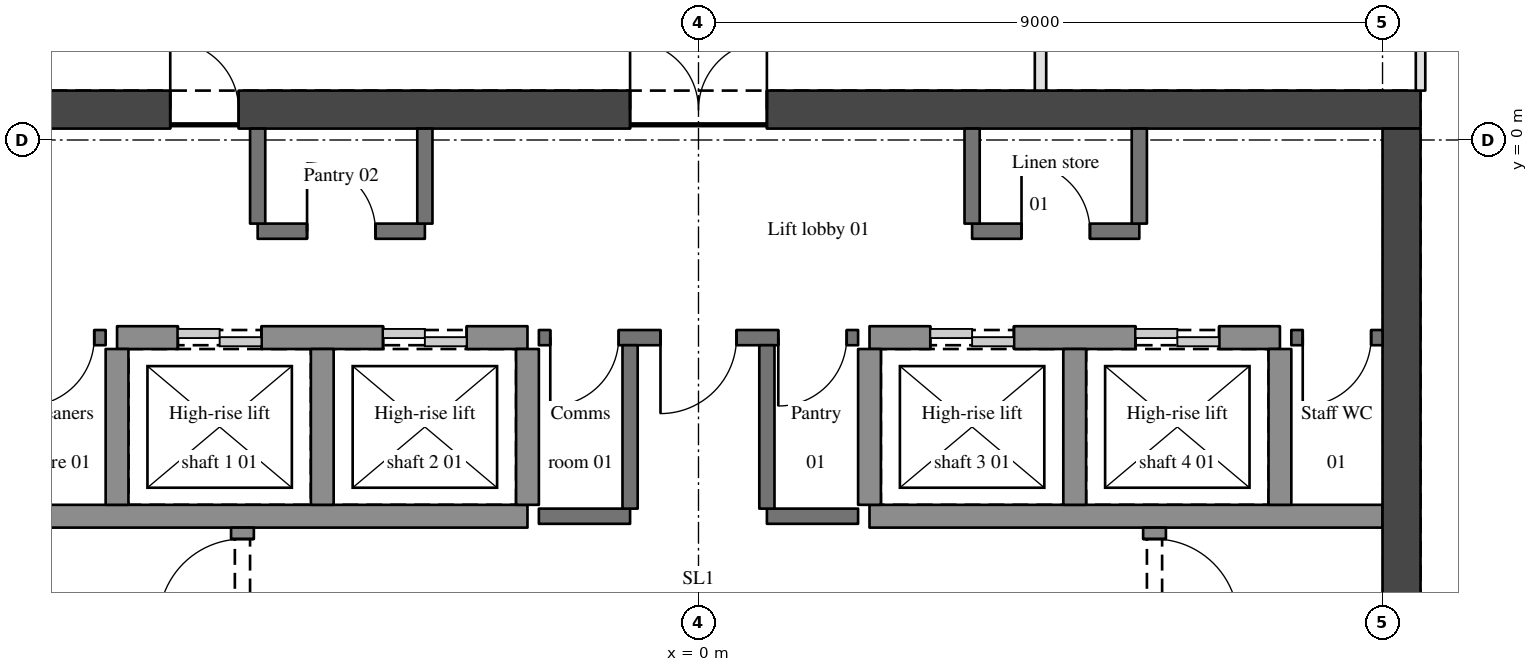
"""IFC4 building model, lengths in metres.
Left out: names, types, materials, properties, quantities, classifications, styles, units other than length and angle.
Written with IfcOpenShell. Run it as: python <this file> out.ifc"""

import sys

from ifc_helpers import new_model, si_unit, direction, frame, frame_2d, origin, place, context, subcontext, project, spatial, rectangle, extrude, element, fill, save


model = new_model("IFC4")
c1 = context("Model", 3, precision=1e-05, world=origin(), true_north=direction((0.0, 1.0)))
c2 = subcontext(c1, "Body", "Model", "MODEL_VIEW")
j1 = project(units=[si_unit("LENGTHUNIT", "METRE"), si_unit("PLANEANGLEUNIT", "RADIAN")], contexts=[c1])
p1 = place(None, origin())
s1 = spatial("IfcSite", under=j1, at=p1, CompositionType="ELEMENT")
p2 = place(p1, origin())
s2 = spatial("IfcBuilding", under=s1, at=p2, CompositionType="ELEMENT")
p3 = place(p2, frame((0.0, 0.0, 217.2)))
s3 = spatial("IfcBuildingStorey", under=s2, at=p3, CompositionType="ELEMENT", Elevation=217.2)
p4 = place(p3, frame((-9.5, 0.4, 0.0), z_axis=(0.0, 0.0, 1.0), x_axis=(1.0, 0.0, 0.0)))
e1 = element("IfcWall", 1, at=p4, inside=s3, PredefinedType="SHEAR", context=c2, shape_type="SweptSolid", body=[
    extrude(rectangle(XDim=19.0, YDim=0.5, at=frame_2d((9.5, 0.0))), origin(), (0.0, 0.0, 1.0), 3.15),
])
p5 = place(p4, frame((8.6, 0.0, 0.0)))
e2 = element("IfcOpeningElement", 2, at=p5, cuts=e1, PredefinedType="OPENING", context=c2, shape_type="SweptSolid", body=[
    extrude(rectangle(XDim=1.8, YDim=2.1, at=frame_2d((0.9, 1.05))), frame((0.0, 0.26, 0.0), z_axis=(0.0, -1.0, 0.0), x_axis=(1.0, 0.0, 0.0)), (0.0, 0.0, 1.0), 0.52),
])
p6 = place(p4, frame((2.55, 0.0, 0.0)))
e3 = element("IfcOpeningElement", 3, at=p6, cuts=e1, PredefinedType="OPENING", context=c2, shape_type="SweptSolid", body=[
    extrude(rectangle(XDim=0.9, YDim=2.1, at=frame_2d((0.45, 1.05))), frame((0.0, 0.26, 0.0), z_axis=(0.0, -1.0, 0.0), x_axis=(1.0, 0.0, 0.0)), (0.0, 0.0, 1.0), 0.52),
])
p7 = place(p3, frame((9.25, -11.5, 0.0), z_axis=(0.0, 0.0, 1.0), x_axis=(0.0, 1.0, 0.0)))
e4 = element("IfcWall", 4, at=p7, inside=s3, PredefinedType="SHEAR", context=c2, shape_type="SweptSolid", body=[
    extrude(rectangle(XDim=11.65, YDim=0.5, at=frame_2d((5.825, 0.0))), origin(), (0.0, 0.0, 1.0), 3.15),
])
p8 = place(p3, frame((-9.0, -4.95, 0.0), z_axis=(0.0, 0.0, 1.0), x_axis=(1.0, 0.0, 0.0)))
e5 = element("IfcWall", 5, at=p8, inside=s3, PredefinedType="SHEAR", context=c2, shape_type="SweptSolid", body=[
    extrude(rectangle(XDim=6.75, YDim=0.3, at=frame_2d((3.375, 0.0))), origin(), (0.0, 0.0, 1.0), 3.15),
])
for number, where, z_axis, x_axis in (
    (6, (-2.1, -4.95, 0.0), (0.0, 0.0, 1.0), (1.0, 0.0, 0.0)),
    (7, (0.9, -4.95, 0.0), (0.0, 0.0, 1.0), (1.0, 0.0, 0.0)),
):
    element("IfcWall", number, at=place(p3, frame(where, z_axis=z_axis, x_axis=x_axis)), inside=s3, PredefinedType="SOLIDWALL", context=c2, shape_type="SweptSolid", body=[
        extrude(rectangle(XDim=1.2, YDim=0.2, at=frame_2d((0.6, 0.0))), origin(), (0.0, 0.0, 1.0), 2.85),
    ])
p9 = place(p3, frame((2.25, -4.95, 0.0), z_axis=(0.0, 0.0, 1.0), x_axis=(1.0, 0.0, 0.0)))
e8 = element("IfcWall", 8, at=p9, inside=s3, PredefinedType="SHEAR", context=c2, shape_type="SweptSolid", body=[
    extrude(rectangle(XDim=6.75, YDim=0.3, at=frame_2d((3.375, 0.0))), origin(), (0.0, 0.0, 1.0), 3.15),
])
p10 = place(p3, frame((-7.8, -2.6, 0.0), z_axis=(0.0, 0.0, 1.0), x_axis=(-1.0, 0.0, 0.0)))
e9 = element("IfcWall", 9, at=p10, inside=s3, PredefinedType="SOLIDWALL", context=c2, shape_type="SweptSolid", body=[
    extrude(rectangle(XDim=1.2, YDim=0.2, at=frame_2d((0.6, 0.0))), origin(), (0.0, 0.0, 1.0), 2.85),
])
p11 = place(p10, frame((0.15, 0.0, 0.0)))
e10 = element("IfcOpeningElement", 10, at=p11, cuts=e9, PredefinedType="OPENING", context=c2, shape_type="SweptSolid", body=[
    extrude(rectangle(XDim=0.9, YDim=2.1, at=frame_2d((0.45, 1.05))), frame((0.0, 0.11, 0.0), z_axis=(0.0, -1.0, 0.0), x_axis=(1.0, 0.0, 0.0)), (0.0, 0.0, 1.0), 0.22),
])
p12 = place(p3, frame((-7.65, -2.6, 0.0), z_axis=(0.0, 0.0, 1.0), x_axis=(1.0, 0.0, 0.0)))
e11 = element("IfcWall", 11, at=p12, inside=s3, PredefinedType="SHEAR", context=c2, shape_type="SweptSolid", body=[
    extrude(rectangle(XDim=5.4, YDim=0.3, at=frame_2d((2.7, 0.0))), origin(), (0.0, 0.0, 1.0), 3.15),
])
p13 = place(p12, frame((0.8, 0.0, 0.0)))
e12 = element("IfcOpeningElement", 12, at=p13, cuts=e11, PredefinedType="OPENING", context=c2, shape_type="SweptSolid", body=[
    extrude(rectangle(XDim=1.1, YDim=2.1, at=frame_2d((0.55, 1.05))), frame((0.0, 0.16, 0.0), z_axis=(0.0, -1.0, 0.0), x_axis=(1.0, 0.0, 0.0)), (0.0, 0.0, 1.0), 0.32),
])
p14 = place(p12, frame((3.5, 0.0, 0.0)))
e13 = element("IfcOpeningElement", 13, at=p14, cuts=e11, PredefinedType="OPENING", context=c2, shape_type="SweptSolid", body=[
    extrude(rectangle(XDim=1.1, YDim=2.1, at=frame_2d((0.55, 1.05))), frame((0.0, 0.16, 0.0), z_axis=(0.0, -1.0, 0.0), x_axis=(1.0, 0.0, 0.0)), (0.0, 0.0, 1.0), 0.32),
])
p15 = place(p3, frame((2.1, -2.6, 0.0), z_axis=(0.0, 0.0, 1.0), x_axis=(-1.0, 0.0, 0.0)))
e14 = element("IfcWall", 14, at=p15, inside=s3, PredefinedType="SOLIDWALL", context=c2, shape_type="SweptSolid", body=[
    extrude(rectangle(XDim=4.2, YDim=0.2, at=frame_2d((2.1, 0.0))), origin(), (0.0, 0.0, 1.0), 2.85),
])
p16 = place(p15, frame((1.6, 0.0, 0.0)))
e15 = element("IfcOpeningElement", 15, at=p16, cuts=e14, PredefinedType="OPENING", context=c2, shape_type="SweptSolid", body=[
    extrude(rectangle(XDim=1.0, YDim=2.1, at=frame_2d((0.5, 1.05))), frame((0.0, 0.11, 0.0), z_axis=(0.0, -1.0, 0.0), x_axis=(1.0, 0.0, 0.0)), (0.0, 0.0, 1.0), 0.22),
])
p17 = place(p15, frame((3.15, 0.0, 0.0)))
e16 = element("IfcOpeningElement", 16, at=p17, cuts=e14, PredefinedType="OPENING", context=c2, shape_type="SweptSolid", body=[
    extrude(rectangle(XDim=0.9, YDim=2.1, at=frame_2d((0.45, 1.05))), frame((0.0, 0.11, 0.0), z_axis=(0.0, -1.0, 0.0), x_axis=(1.0, 0.0, 0.0)), (0.0, 0.0, 1.0), 0.22),
])
p18 = place(p15, frame((0.15, 0.0, 0.0)))
e17 = element("IfcOpeningElement", 17, at=p18, cuts=e14, PredefinedType="OPENING", context=c2, shape_type="SweptSolid", body=[
    extrude(rectangle(XDim=0.9, YDim=2.1, at=frame_2d((0.45, 1.05))), frame((0.0, 0.11, 0.0), z_axis=(0.0, -1.0, 0.0), x_axis=(1.0, 0.0, 0.0)), (0.0, 0.0, 1.0), 0.22),
])
p19 = place(p3, frame((2.25, -2.6, 0.0), z_axis=(0.0, 0.0, 1.0), x_axis=(1.0, 0.0, 0.0)))
e18 = element("IfcWall", 18, at=p19, inside=s3, PredefinedType="SHEAR", context=c2, shape_type="SweptSolid", body=[
    extrude(rectangle(XDim=5.4, YDim=0.3, at=frame_2d((2.7, 0.0))), origin(), (0.0, 0.0, 1.0), 3.15),
])
p20 = place(p19, frame((0.8, 0.0, 0.0)))
e19 = element("IfcOpeningElement", 19, at=p20, cuts=e18, PredefinedType="OPENING", context=c2, shape_type="SweptSolid", body=[
    extrude(rectangle(XDim=1.1, YDim=2.1, at=frame_2d((0.55, 1.05))), frame((0.0, 0.16, 0.0), z_axis=(0.0, -1.0, 0.0), x_axis=(1.0, 0.0, 0.0)), (0.0, 0.0, 1.0), 0.32),
])
p21 = place(p19, frame((3.5, 0.0, 0.0)))
e20 = element("IfcOpeningElement", 20, at=p21, cuts=e18, PredefinedType="OPENING", context=c2, shape_type="SweptSolid", body=[
    extrude(rectangle(XDim=1.1, YDim=2.1, at=frame_2d((0.55, 1.05))), frame((0.0, 0.16, 0.0), z_axis=(0.0, -1.0, 0.0), x_axis=(1.0, 0.0, 0.0)), (0.0, 0.0, 1.0), 0.32),
])
p22 = place(p3, frame((9.0, -2.6, 0.0), z_axis=(0.0, 0.0, 1.0), x_axis=(-1.0, 0.0, 0.0)))
e21 = element("IfcWall", 21, at=p22, inside=s3, PredefinedType="SOLIDWALL", context=c2, shape_type="SweptSolid", body=[
    extrude(rectangle(XDim=1.2, YDim=0.2, at=frame_2d((0.6, 0.0))), origin(), (0.0, 0.0, 1.0), 2.85),
])
p23 = place(p22, frame((0.15, 0.0, 0.0)))
e22 = element("IfcOpeningElement", 22, at=p23, cuts=e21, PredefinedType="OPENING", context=c2, shape_type="SweptSolid", body=[
    extrude(rectangle(XDim=0.9, YDim=2.1, at=frame_2d((0.45, 1.05))), frame((0.0, 0.11, 0.0), z_axis=(0.0, -1.0, 0.0), x_axis=(1.0, 0.0, 0.0)), (0.0, 0.0, 1.0), 0.22),
])
p24 = place(p3, frame((-5.8, -1.2, 0.0), z_axis=(0.0, 0.0, 1.0), x_axis=(1.0, 0.0, 0.0)))
e23 = element("IfcWall", 23, at=p24, inside=s3, PredefinedType="SOLIDWALL", context=c2, shape_type="SweptSolid", body=[
    extrude(rectangle(XDim=2.2, YDim=0.2, at=frame_2d((1.1, 0.0))), origin(), (0.0, 0.0, 1.0), 2.85),
])
p25 = place(p24, frame((0.65, 0.0, 0.0)))
e24 = element("IfcOpeningElement", 24, at=p25, cuts=e23, PredefinedType="OPENING", context=c2, shape_type="SweptSolid", body=[
    extrude(rectangle(XDim=0.9, YDim=2.1, at=frame_2d((0.45, 1.05))), frame((0.0, 0.11, 0.0), z_axis=(0.0, -1.0, 0.0), x_axis=(1.0, 0.0, 0.0)), (0.0, 0.0, 1.0), 0.22),
])
p26 = place(p3, frame((3.6, -1.2, 0.0), z_axis=(0.0, 0.0, 1.0), x_axis=(1.0, 0.0, 0.0)))
e25 = element("IfcWall", 25, at=p26, inside=s3, PredefinedType="SOLIDWALL", context=c2, shape_type="SweptSolid", body=[
    extrude(rectangle(XDim=2.2, YDim=0.2, at=frame_2d((1.1, 0.0))), origin(), (0.0, 0.0, 1.0), 2.85),
])
p27 = place(p26, frame((0.65, 0.0, 0.0)))
e26 = element("IfcOpeningElement", 26, at=p27, cuts=e25, PredefinedType="OPENING", context=c2, shape_type="SweptSolid", body=[
    extrude(rectangle(XDim=0.9, YDim=2.1, at=frame_2d((0.45, 1.05))), frame((0.0, 0.11, 0.0), z_axis=(0.0, -1.0, 0.0), x_axis=(1.0, 0.0, 0.0)), (0.0, 0.0, 1.0), 0.22),
])
p28 = place(p3, frame((-7.65, -4.8, 0.0), z_axis=(0.0, 0.0, 1.0), x_axis=(0.0, 1.0, 0.0)))
e27 = element("IfcWall", 27, at=p28, inside=s3, PredefinedType="SHEAR", context=c2, shape_type="SweptSolid", body=[
    extrude(rectangle(XDim=2.05, YDim=0.3, at=frame_2d((1.025, 0.0))), origin(), (0.0, 0.0, 1.0), 3.15),
])
p29 = place(p3, frame((-6.0, -11.5, 0.0), z_axis=(0.0, 0.0, 1.0), x_axis=(0.0, 1.0, 0.0)))
e28 = element("IfcWall", 28, at=p29, inside=s3, PredefinedType="SHEAR", context=c2, shape_type="SweptSolid", body=[
    extrude(rectangle(XDim=6.4, YDim=0.3, at=frame_2d((3.2, 0.0))), origin(), (0.0, 0.0, 1.0), 3.15),
])
p30 = place(p29, frame((5.15, 0.0, 0.0)))
e29 = element("IfcOpeningElement", 29, at=p30, cuts=e28, PredefinedType="OPENING", context=c2, shape_type="SweptSolid", body=[
    extrude(rectangle(XDim=1.1, YDim=2.1, at=frame_2d((0.55, 1.05))), frame((0.0, 0.16, 0.0), z_axis=(0.0, -1.0, 0.0), x_axis=(1.0, 0.0, 0.0)), (0.0, 0.0, 1.0), 0.32),
])
p31 = place(p3, frame((-5.8, -1.1, 0.0), z_axis=(0.0, 0.0, 1.0), x_axis=(0.0, 1.0, 0.0)))
e30 = element("IfcWall", 30, at=p31, inside=s3, PredefinedType="SOLIDWALL", context=c2, shape_type="SweptSolid", body=[
    extrude(rectangle(XDim=1.25, YDim=0.2, at=frame_2d((0.625, 0.0))), origin(), (0.0, 0.0, 1.0), 2.85),
])
p32 = place(p3, frame((-4.95, -4.8, 0.0), z_axis=(0.0, 0.0, 1.0), x_axis=(0.0, 1.0, 0.0)))
e31 = element("IfcWall", 31, at=p32, inside=s3, PredefinedType="SHEAR", context=c2, shape_type="SweptSolid", body=[
    extrude(rectangle(XDim=2.05, YDim=0.3, at=frame_2d((1.025, 0.0))), origin(), (0.0, 0.0, 1.0), 3.15),
])
p33 = place(p3, frame((-3.6, -1.1, 0.0), z_axis=(0.0, 0.0, 1.0), x_axis=(0.0, 1.0, 0.0)))
e32 = element("IfcWall", 32, at=p33, inside=s3, PredefinedType="SOLIDWALL", context=c2, shape_type="SweptSolid", body=[
    extrude(rectangle(XDim=1.25, YDim=0.2, at=frame_2d((0.625, 0.0))), origin(), (0.0, 0.0, 1.0), 2.85),
])
p34 = place(p3, frame((-2.25, -4.8, 0.0), z_axis=(0.0, 0.0, 1.0), x_axis=(0.0, 1.0, 0.0)))
e33 = element("IfcWall", 33, at=p34, inside=s3, PredefinedType="SHEAR", context=c2, shape_type="SweptSolid", body=[
    extrude(rectangle(XDim=2.05, YDim=0.3, at=frame_2d((1.025, 0.0))), origin(), (0.0, 0.0, 1.0), 3.15),
])
for number, where, z_axis, x_axis in (
    (34, (-0.9, -4.85, 0.0), (0.0, 0.0, 1.0), (0.0, 1.0, 0.0)),
    (35, (0.9, -4.85, 0.0), (0.0, 0.0, 1.0), (0.0, 1.0, 0.0)),
):
    element("IfcWall", number, at=place(p3, frame(where, z_axis=z_axis, x_axis=x_axis)), inside=s3, PredefinedType="SOLIDWALL", context=c2, shape_type="SweptSolid", body=[
        extrude(rectangle(XDim=2.15, YDim=0.2, at=frame_2d((1.075, 0.0))), origin(), (0.0, 0.0, 1.0), 2.85),
    ])
p35 = place(p3, frame((2.25, -4.8, 0.0), z_axis=(0.0, 0.0, 1.0), x_axis=(0.0, 1.0, 0.0)))
e36 = element("IfcWall", 36, at=p35, inside=s3, PredefinedType="SHEAR", context=c2, shape_type="SweptSolid", body=[
    extrude(rectangle(XDim=2.05, YDim=0.3, at=frame_2d((1.025, 0.0))), origin(), (0.0, 0.0, 1.0), 3.15),
])
p36 = place(p3, frame((3.6, -1.1, 0.0), z_axis=(0.0, 0.0, 1.0), x_axis=(0.0, 1.0, 0.0)))
e37 = element("IfcWall", 37, at=p36, inside=s3, PredefinedType="SOLIDWALL", context=c2, shape_type="SweptSolid", body=[
    extrude(rectangle(XDim=1.25, YDim=0.2, at=frame_2d((0.625, 0.0))), origin(), (0.0, 0.0, 1.0), 2.85),
])
p37 = place(p3, frame((4.5, 5.325, 0.0), z_axis=(0.0, 0.0, 1.0), x_axis=(0.0, -1.0, 0.0)))
e38 = element("IfcWall", 38, at=p37, inside=s3, PredefinedType="PARTITIONING", context=c2, shape_type="SweptSolid", body=[
    extrude(rectangle(XDim=4.675, YDim=0.15, at=frame_2d((2.337, 0.0))), origin(), (0.0, 0.0, 1.0), 2.21),
])
p38 = place(p37, frame((1.85, 0.0, 0.0)))
e39 = element("IfcOpeningElement", 39, at=p38, cuts=e38, PredefinedType="OPENING", context=c2, shape_type="SweptSolid", body=[
    extrude(rectangle(XDim=0.9, YDim=2.1, at=frame_2d((0.45, 1.05))), frame((0.0, 0.085, 0.0), z_axis=(0.0, -1.0, 0.0), x_axis=(1.0, 0.0, 0.0)), (0.0, 0.0, 1.0), 0.17),
])
p39 = place(p3, frame((4.95, -4.8, 0.0), z_axis=(0.0, 0.0, 1.0), x_axis=(0.0, 1.0, 0.0)))
e40 = element("IfcWall", 40, at=p39, inside=s3, PredefinedType="SHEAR", context=c2, shape_type="SweptSolid", body=[
    extrude(rectangle(XDim=2.05, YDim=0.3, at=frame_2d((1.025, 0.0))), origin(), (0.0, 0.0, 1.0), 3.15),
])
p40 = place(p3, frame((5.8, -1.1, 0.0), z_axis=(0.0, 0.0, 1.0), x_axis=(0.0, 1.0, 0.0)))
e41 = element("IfcWall", 41, at=p40, inside=s3, PredefinedType="SOLIDWALL", context=c2, shape_type="SweptSolid", body=[
    extrude(rectangle(XDim=1.25, YDim=0.2, at=frame_2d((0.625, 0.0))), origin(), (0.0, 0.0, 1.0), 2.85),
])
p41 = place(p3, frame((6.0, -5.1, 0.0), z_axis=(0.0, 0.0, 1.0), x_axis=(0.0, -1.0, 0.0)))
e42 = element("IfcWall", 42, at=p41, inside=s3, PredefinedType="SHEAR", context=c2, shape_type="SweptSolid", body=[
    extrude(rectangle(XDim=6.4, YDim=0.3, at=frame_2d((3.2, 0.0))), origin(), (0.0, 0.0, 1.0), 3.15),
])
p42 = place(p41, frame((0.15, 0.0, 0.0)))
e43 = element("IfcOpeningElement", 43, at=p42, cuts=e42, PredefinedType="OPENING", context=c2, shape_type="SweptSolid", body=[
    extrude(rectangle(XDim=1.1, YDim=2.1, at=frame_2d((0.55, 1.05))), frame((0.0, 0.16, 0.0), z_axis=(0.0, -1.0, 0.0), x_axis=(1.0, 0.0, 0.0)), (0.0, 0.0, 1.0), 0.32),
])
p43 = place(p3, frame((7.65, -4.8, 0.0), z_axis=(0.0, 0.0, 1.0), x_axis=(0.0, 1.0, 0.0)))
e44 = element("IfcWall", 44, at=p43, inside=s3, PredefinedType="SHEAR", context=c2, shape_type="SweptSolid", body=[
    extrude(rectangle(XDim=2.05, YDim=0.3, at=frame_2d((1.025, 0.0))), origin(), (0.0, 0.0, 1.0), 3.15),
])
p44 = place(p3, frame((9.5, 0.65, 0.0), z_axis=(0.0, 0.0, 1.0), x_axis=(0.0, 1.0, 0.0)))
e45 = element("IfcWall", 45, at=p44, inside=s3, PredefinedType="PARTITIONING", context=c2, shape_type="SweptSolid", body=[
    extrude(rectangle(XDim=8.85, YDim=0.125, at=frame_2d((4.425, 0.0))), origin(), (0.0, 0.0, 1.0), 2.21),
])
p45 = place(p5, origin())
e46 = element("IfcDoor", 46, at=p45, inside=s3, OperationType="DOUBLE_DOOR_SINGLE_SWING", PredefinedType="DOOR", context=c2, shape_type="SweptSolid", body=[
    extrude(rectangle(XDim=1.8, YDim=2.1, at=frame_2d((0.9, 1.05))), frame((0.0, 0.025, 0.0), z_axis=(0.0, -1.0, 0.0), x_axis=(1.0, 0.0, 0.0)), (0.0, 0.0, 1.0), 0.05),
])
fill(e2, e46)
p46 = place(p16, origin())
e47 = element("IfcDoor", 47, at=p46, inside=s3, OperationType="SINGLE_SWING_RIGHT", PredefinedType="DOOR", context=c2, shape_type="SweptSolid", body=[
    extrude(rectangle(XDim=1.0, YDim=2.1, at=frame_2d((0.5, 1.05))), frame((0.0, 0.025, 0.0), z_axis=(0.0, -1.0, 0.0), x_axis=(1.0, 0.0, 0.0)), (0.0, 0.0, 1.0), 0.05),
])
fill(e15, e47)
p47 = place(p30, origin())
e48 = element("IfcDoor", 48, at=p47, inside=s3, OperationType="SINGLE_SWING_LEFT", PredefinedType="DOOR", context=c2, shape_type="SweptSolid", body=[
    extrude(rectangle(XDim=1.1, YDim=2.1, at=frame_2d((0.55, 1.05))), frame((0.0, 0.025, 0.0), z_axis=(0.0, -1.0, 0.0), x_axis=(1.0, 0.0, 0.0)), (0.0, 0.0, 1.0), 0.05),
])
fill(e29, e48)
p48 = place(p42, origin())
e49 = element("IfcDoor", 49, at=p48, inside=s3, OperationType="SINGLE_SWING_RIGHT", PredefinedType="DOOR", context=c2, shape_type="SweptSolid", body=[
    extrude(rectangle(XDim=1.1, YDim=2.1, at=frame_2d((0.55, 1.05))), frame((0.0, 0.025, 0.0), z_axis=(0.0, -1.0, 0.0), x_axis=(1.0, 0.0, 0.0)), (0.0, 0.0, 1.0), 0.05),
])
fill(e43, e49)
p49 = place(p17, origin())
e50 = element("IfcDoor", 50, at=p49, inside=s3, OperationType="SINGLE_SWING_RIGHT", PredefinedType="DOOR", context=c2, shape_type="SweptSolid", body=[
    extrude(rectangle(XDim=0.9, YDim=2.1, at=frame_2d((0.45, 1.05))), frame((0.0, 0.025, 0.0), z_axis=(0.0, -1.0, 0.0), x_axis=(1.0, 0.0, 0.0)), (0.0, 0.0, 1.0), 0.05),
])
fill(e16, e50)
p50 = place(p18, origin())
e51 = element("IfcDoor", 51, at=p50, inside=s3, OperationType="SINGLE_SWING_RIGHT", PredefinedType="DOOR", context=c2, shape_type="SweptSolid", body=[
    extrude(rectangle(XDim=0.9, YDim=2.1, at=frame_2d((0.45, 1.05))), frame((0.0, 0.025, 0.0), z_axis=(0.0, -1.0, 0.0), x_axis=(1.0, 0.0, 0.0)), (0.0, 0.0, 1.0), 0.05),
])
fill(e17, e51)
p51 = place(p23, origin())
e52 = element("IfcDoor", 52, at=p51, inside=s3, OperationType="SINGLE_SWING_RIGHT", PredefinedType="DOOR", context=c2, shape_type="SweptSolid", body=[
    extrude(rectangle(XDim=0.9, YDim=2.1, at=frame_2d((0.45, 1.05))), frame((0.0, 0.025, 0.0), z_axis=(0.0, -1.0, 0.0), x_axis=(1.0, 0.0, 0.0)), (0.0, 0.0, 1.0), 0.05),
])
fill(e22, e52)
p52 = place(p11, origin())
e53 = element("IfcDoor", 53, at=p52, inside=s3, OperationType="SINGLE_SWING_RIGHT", PredefinedType="DOOR", context=c2, shape_type="SweptSolid", body=[
    extrude(rectangle(XDim=0.9, YDim=2.1, at=frame_2d((0.45, 1.05))), frame((0.0, 0.025, 0.0), z_axis=(0.0, -1.0, 0.0), x_axis=(1.0, 0.0, 0.0)), (0.0, 0.0, 1.0), 0.05),
])
fill(e10, e53)
p53 = place(p6, origin())
e54 = element("IfcDoor", 54, at=p53, inside=s3, OperationType="SINGLE_SWING_LEFT", PredefinedType="DOOR", context=c2, shape_type="SweptSolid", body=[
    extrude(rectangle(XDim=0.9, YDim=2.1, at=frame_2d((0.45, 1.05))), frame((0.0, 0.025, 0.0), z_axis=(0.0, -1.0, 0.0), x_axis=(1.0, 0.0, 0.0)), (0.0, 0.0, 1.0), 0.05),
])
fill(e3, e54)
p54 = place(p25, origin())
e55 = element("IfcDoor", 55, at=p54, inside=s3, OperationType="SINGLE_SWING_LEFT", PredefinedType="DOOR", context=c2, shape_type="SweptSolid", body=[
    extrude(rectangle(XDim=0.9, YDim=2.1, at=frame_2d((0.45, 1.05))), frame((0.0, 0.025, 0.0), z_axis=(0.0, -1.0, 0.0), x_axis=(1.0, 0.0, 0.0)), (0.0, 0.0, 1.0), 0.05),
])
fill(e24, e55)
p55 = place(p27, origin())
e56 = element("IfcDoor", 56, at=p55, inside=s3, OperationType="SINGLE_SWING_LEFT", PredefinedType="DOOR", context=c2, shape_type="SweptSolid", body=[
    extrude(rectangle(XDim=0.9, YDim=2.1, at=frame_2d((0.45, 1.05))), frame((0.0, 0.025, 0.0), z_axis=(0.0, -1.0, 0.0), x_axis=(1.0, 0.0, 0.0)), (0.0, 0.0, 1.0), 0.05),
])
fill(e26, e56)
p56 = place(p13, origin())
e57 = element("IfcDoor", 57, at=p56, inside=s3, OperationType="DOUBLE_DOOR_SLIDING", PredefinedType="DOOR", context=c2, shape_type="SweptSolid", body=[
    extrude(rectangle(XDim=1.1, YDim=2.1, at=frame_2d((0.55, 1.05))), frame((0.0, 0.025, 0.0), z_axis=(0.0, -1.0, 0.0), x_axis=(1.0, 0.0, 0.0)), (0.0, 0.0, 1.0), 0.05),
])
fill(e12, e57)
p57 = place(p14, origin())
e58 = element("IfcDoor", 58, at=p57, inside=s3, OperationType="DOUBLE_DOOR_SLIDING", PredefinedType="DOOR", context=c2, shape_type="SweptSolid", body=[
    extrude(rectangle(XDim=1.1, YDim=2.1, at=frame_2d((0.55, 1.05))), frame((0.0, 0.025, 0.0), z_axis=(0.0, -1.0, 0.0), x_axis=(1.0, 0.0, 0.0)), (0.0, 0.0, 1.0), 0.05),
])
fill(e13, e58)
p58 = place(p20, origin())
e59 = element("IfcDoor", 59, at=p58, inside=s3, OperationType="DOUBLE_DOOR_SLIDING", PredefinedType="DOOR", context=c2, shape_type="SweptSolid", body=[
    extrude(rectangle(XDim=1.1, YDim=2.1, at=frame_2d((0.55, 1.05))), frame((0.0, 0.025, 0.0), z_axis=(0.0, -1.0, 0.0), x_axis=(1.0, 0.0, 0.0)), (0.0, 0.0, 1.0), 0.05),
])
fill(e19, e59)
p59 = place(p21, origin())
e60 = element("IfcDoor", 60, at=p59, inside=s3, OperationType="DOUBLE_DOOR_SLIDING", PredefinedType="DOOR", context=c2, shape_type="SweptSolid", body=[
    extrude(rectangle(XDim=1.1, YDim=2.1, at=frame_2d((0.55, 1.05))), frame((0.0, 0.025, 0.0), z_axis=(0.0, -1.0, 0.0), x_axis=(1.0, 0.0, 0.0)), (0.0, 0.0, 1.0), 0.05),
])
fill(e20, e60)
save(model, sys.argv[1])
